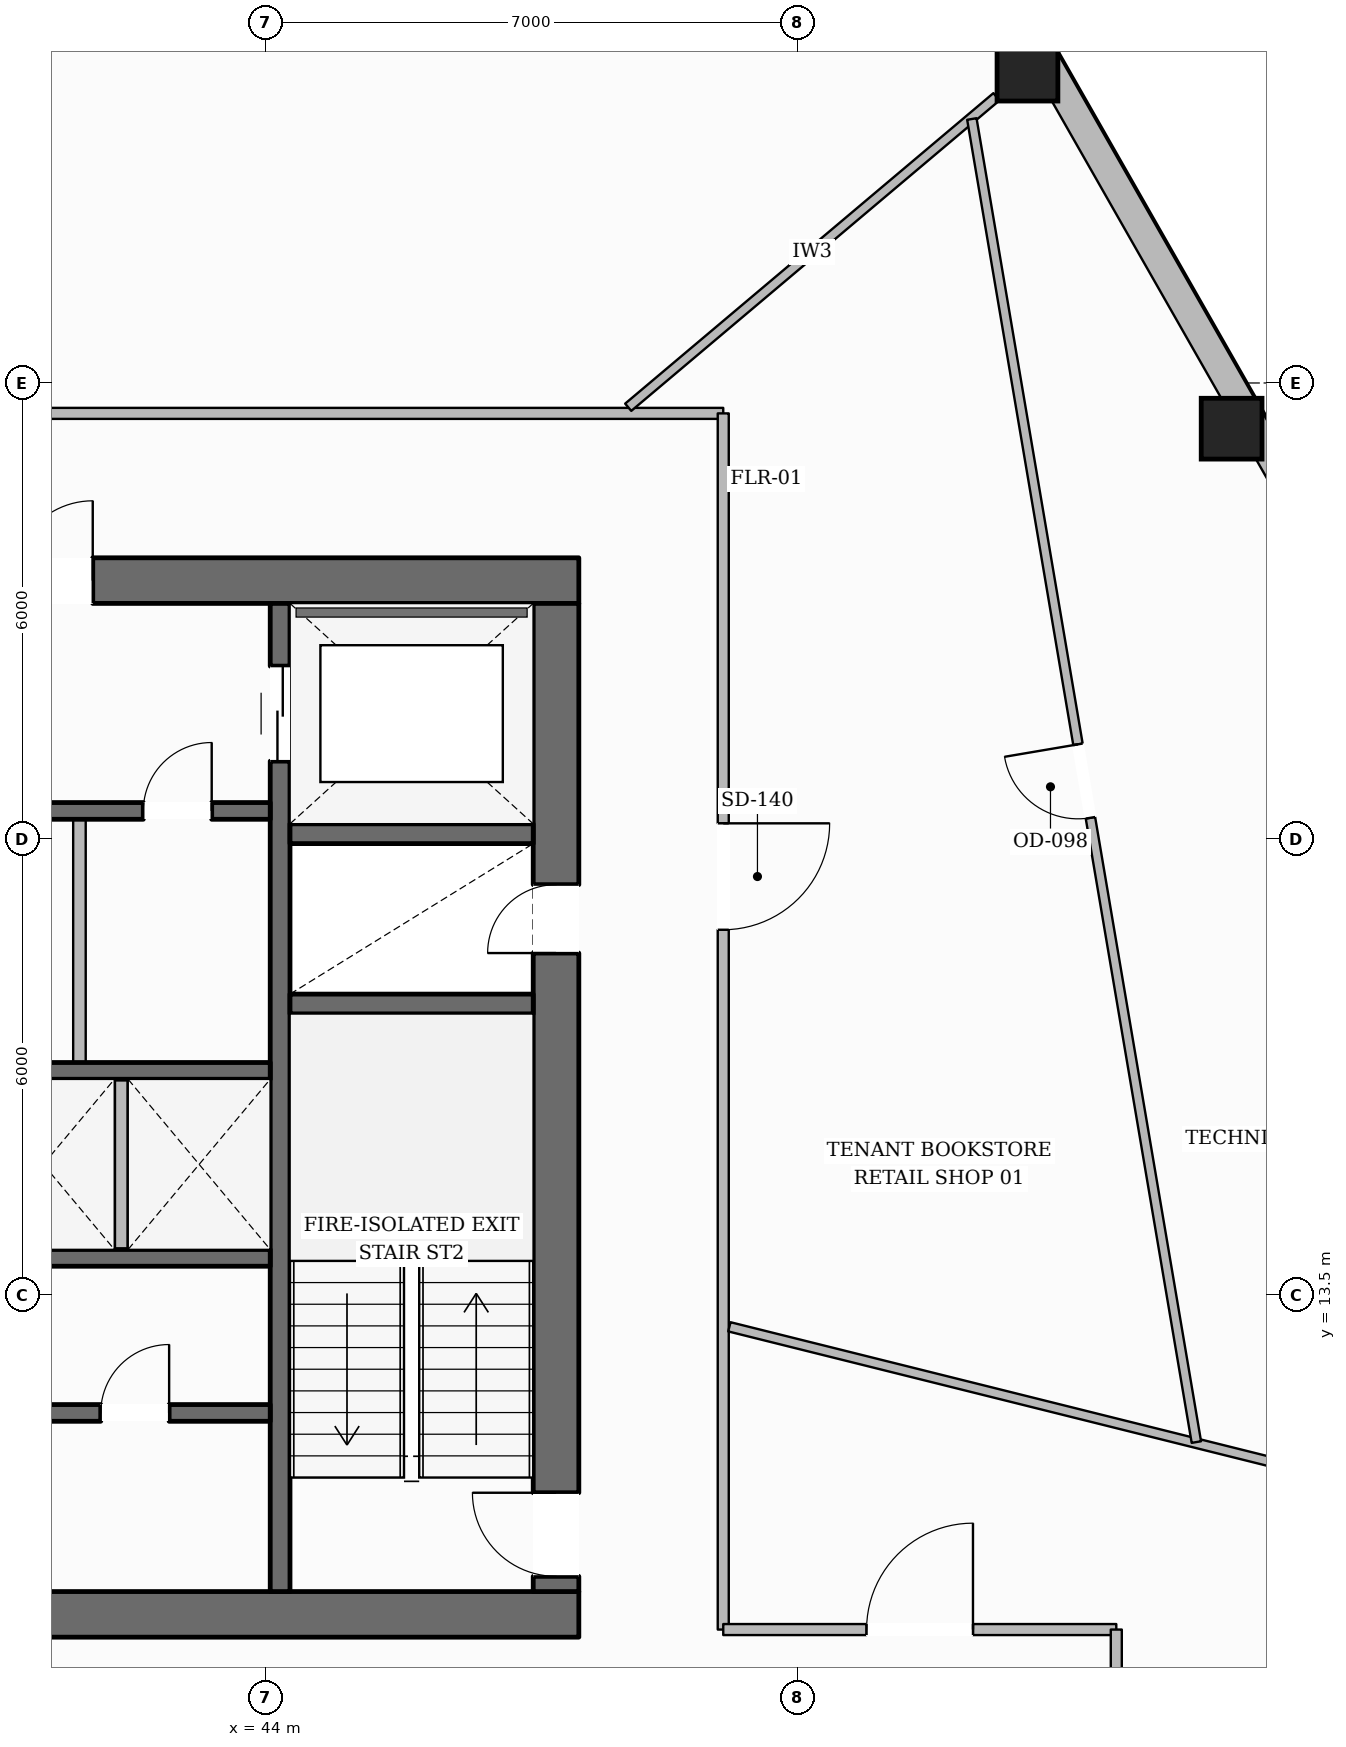
"""IFC4 building model, lengths in metres.
Left out: names, types, materials, properties, quantities, classifications, styles, units other than length and angle.
Written with IfcOpenShell. Run it as: python <this file> out.ifc"""

import sys

from ifc_helpers import new_model, si_unit, direction, frame, frame_2d, origin, origin_2d, place, context, subcontext, project, spatial, rectangle, hollow_rectangle, extrude, element, fill, save


model = new_model("IFC4")
c1 = context("Model", 3, precision=1e-05, world=origin(), true_north=direction((0.0, 1.0)))
c2 = subcontext(c1, "Body", "Model", "MODEL_VIEW")
j1 = project(units=[si_unit("LENGTHUNIT", "METRE"), si_unit("PLANEANGLEUNIT", "RADIAN")], contexts=[c1])
p1 = place(None, origin())
s1 = spatial("IfcSite", under=j1, at=p1, CompositionType="ELEMENT")
p2 = place(p1, origin())
s2 = spatial("IfcBuilding", under=s1, at=p2, CompositionType="ELEMENT")
p3 = place(p2, frame((0.0, 0.0, 13.7)))
s3 = spatial("IfcBuildingStorey", under=s2, at=p3, CompositionType="ELEMENT", Elevation=13.7)
p4 = place(p3, frame((27.88, 9.3, 0.0), z_axis=(0.0, 0.0, 1.0), x_axis=(1.0, 0.0, 0.0)))
e1 = element("IfcWall", 1, at=p4, inside=s3, PredefinedType="SOLIDWALL", context=c2, shape_type="SweptSolid", body=[
    extrude(rectangle(XDim=20.24, YDim=0.6, at=frame_2d((10.12, 0.0))), origin(), (0.0, 0.0, 1.0), 3.59),
])
p5 = place(p4, frame((10.62, 0.0, 0.0)))
e2 = element("IfcOpeningElement", 2, at=p5, cuts=e1, PredefinedType="OPENING", context=c2, shape_type="SweptSolid", body=[
    extrude(rectangle(XDim=1.4, YDim=2.2, at=frame_2d((0.7, 1.1))), frame((0.0, 0.31, 0.0), z_axis=(0.0, -1.0, 0.0), x_axis=(1.0, 0.0, 0.0)), (0.0, 0.0, 1.0), 0.62),
])
p6 = place(p3, frame((27.88, 22.9, 0.0), z_axis=(0.0, 0.0, 1.0), x_axis=(1.0, 0.0, 0.0)))
e3 = element("IfcWall", 3, at=p6, inside=s3, PredefinedType="SOLIDWALL", context=c2, shape_type="SweptSolid", body=[
    extrude(rectangle(XDim=20.24, YDim=0.6, at=frame_2d((10.12, 0.0))), origin(), (0.0, 0.0, 1.0), 3.59),
])
p7 = place(p6, frame((6.395, 0.0, 0.0)))
e4 = element("IfcOpeningElement", 4, at=p7, cuts=e3, PredefinedType="OPENING", context=c2, shape_type="SweptSolid", body=[
    extrude(rectangle(XDim=1.05, YDim=2.15, at=frame_2d((0.525, 1.075))), frame((0.0, 0.31, 0.0), z_axis=(0.0, -1.0, 0.0), x_axis=(1.0, 0.0, 0.0)), (0.0, 0.0, 1.0), 0.62),
])
p8 = place(p6, frame((12.795, 0.0, 0.0)))
e5 = element("IfcOpeningElement", 5, at=p8, cuts=e3, PredefinedType="OPENING", context=c2, shape_type="SweptSolid", body=[
    extrude(rectangle(XDim=1.05, YDim=2.15, at=frame_2d((0.525, 1.075))), frame((0.0, 0.31, 0.0), z_axis=(0.0, -1.0, 0.0), x_axis=(1.0, 0.0, 0.0)), (0.0, 0.0, 1.0), 0.62),
])
p9 = place(p3, frame((47.82, 9.6, 0.0), z_axis=(0.0, 0.0, 1.0), x_axis=(0.0, 1.0, 0.0)))
e6 = element("IfcWall", 6, at=p9, inside=s3, PredefinedType="SOLIDWALL", context=c2, shape_type="SweptSolid", body=[
    extrude(rectangle(XDim=13.0, YDim=0.6, at=frame_2d((6.5, 0.0))), origin(), (0.0, 0.0, 1.0), 3.59),
])
p10 = place(p9, frame((0.2, 0.0, 0.0)))
e7 = element("IfcOpeningElement", 7, at=p10, cuts=e6, PredefinedType="OPENING", context=c2, shape_type="SweptSolid", body=[
    extrude(rectangle(XDim=1.1, YDim=2.15, at=frame_2d((0.55, 1.075))), frame((0.0, 0.31, 0.0), z_axis=(0.0, -1.0, 0.0), x_axis=(1.0, 0.0, 0.0)), (0.0, 0.0, 1.0), 0.62),
])
p11 = place(p9, frame((8.4, 0.0, 0.0)))
e8 = element("IfcOpeningElement", 8, at=p11, cuts=e6, PredefinedType="OPENING", context=c2, shape_type="SweptSolid", body=[
    extrude(rectangle(XDim=0.9, YDim=2.1, at=frame_2d((0.45, 1.05))), frame((0.0, 0.31, 0.0), z_axis=(0.0, -1.0, 0.0), x_axis=(1.0, 0.0, 0.0)), (0.0, 0.0, 1.0), 0.62),
])
p12 = place(p3, frame((44.19, 9.6, 0.0), z_axis=(0.0, 0.0, 1.0), x_axis=(0.0, 1.0, 0.0)))
e9 = element("IfcWall", 9, at=p12, inside=s3, PredefinedType="SHEAR", context=c2, shape_type="SweptSolid", body=[
    extrude(rectangle(XDim=13.0, YDim=0.26, at=frame_2d((6.5, 0.0))), origin(), (0.0, 0.0, 1.0), 3.59),
])
p13 = place(p12, frame((10.925, 0.0, 0.0)))
e10 = element("IfcOpeningElement", 10, at=p13, cuts=e9, PredefinedType="OPENING", context=c2, shape_type="SweptSolid", body=[
    extrude(rectangle(XDim=1.25, YDim=2.25, at=frame_2d((0.625, 1.125))), frame((0.0, 0.14, 0.0), z_axis=(0.0, -1.0, 0.0), x_axis=(1.0, 0.0, 0.0)), (0.0, 0.0, 1.0), 0.28),
])
for number, where, z_axis, x_axis in (
    (11, (44.32, 17.33, 0.0), (0.0, 0.0, 1.0), (1.0, 0.0, 0.0)),
    (12, (44.32, 19.57, 0.0), (0.0, 0.0, 1.0), (1.0, 0.0, 0.0)),
):
    element("IfcWall", number, at=place(p3, frame(where, z_axis=z_axis, x_axis=x_axis)), inside=s3, PredefinedType="SHEAR", context=c2, shape_type="SweptSolid", body=[
        extrude(rectangle(XDim=3.2, YDim=0.26, at=frame_2d((1.6, 0.0))), origin(), (0.0, 0.0, 1.0), 3.59),
    ])
p14 = place(p3, frame((31.94, 19.87, 0.0), z_axis=(0.0, 0.0, 1.0), x_axis=(1.0, 0.0, 0.0)))
e13 = element("IfcWall", 13, at=p14, inside=s3, PredefinedType="SOLIDWALL", context=c2, shape_type="SweptSolid", body=[
    extrude(rectangle(XDim=12.12, YDim=0.22, at=frame_2d((6.06, 0.0))), origin(), (0.0, 0.0, 1.0), 3.59),
])
p15 = place(p14, frame((6.3, 0.0, 0.0)))
e14 = element("IfcOpeningElement", 14, at=p15, cuts=e13, PredefinedType="OPENING", context=c2, shape_type="SweptSolid", body=[
    extrude(rectangle(XDim=1.1, YDim=2.15, at=frame_2d((0.55, 1.075))), frame((0.0, 0.12, 0.0), z_axis=(0.0, -1.0, 0.0), x_axis=(1.0, 0.0, 0.0)), (0.0, 0.0, 1.0), 0.24),
])
p16 = place(p14, frame((8.23, 0.0, 0.0)))
e15 = element("IfcOpeningElement", 15, at=p16, cuts=e13, PredefinedType="OPENING", context=c2, shape_type="SweptSolid", body=[
    extrude(rectangle(XDim=0.9, YDim=2.1, at=frame_2d((0.45, 1.05))), frame((0.0, 0.12, 0.0), z_axis=(0.0, -1.0, 0.0), x_axis=(1.0, 0.0, 0.0)), (0.0, 0.0, 1.0), 0.24),
])
p17 = place(p14, frame((10.45, 0.0, 0.0)))
e16 = element("IfcOpeningElement", 16, at=p17, cuts=e13, PredefinedType="OPENING", context=c2, shape_type="SweptSolid", body=[
    extrude(rectangle(XDim=0.9, YDim=2.1, at=frame_2d((0.45, 1.05))), frame((0.0, 0.12, 0.0), z_axis=(0.0, -1.0, 0.0), x_axis=(1.0, 0.0, 0.0)), (0.0, 0.0, 1.0), 0.24),
])
p18 = place(p3, frame((31.94, 16.45, 0.0), z_axis=(0.0, 0.0, 1.0), x_axis=(1.0, 0.0, 0.0)))
e17 = element("IfcWall", 17, at=p18, inside=s3, PredefinedType="SOLIDWALL", context=c2, shape_type="SweptSolid", body=[
    extrude(rectangle(XDim=12.12, YDim=0.22, at=frame_2d((6.06, 0.0))), origin(), (0.0, 0.0, 1.0), 3.59),
])
p19 = place(p3, frame((31.94, 13.99, 0.0), z_axis=(0.0, 0.0, 1.0), x_axis=(1.0, 0.0, 0.0)))
e18 = element("IfcWall", 18, at=p19, inside=s3, PredefinedType="SOLIDWALL", context=c2, shape_type="SweptSolid", body=[
    extrude(rectangle(XDim=12.12, YDim=0.22, at=frame_2d((6.06, 0.0))), origin(), (0.0, 0.0, 1.0), 3.59),
])
p20 = place(p19, frame((0.385, 0.0, 0.0)))
e19 = element("IfcOpeningElement", 19, at=p20, cuts=e18, PredefinedType="OPENING", context=c2, shape_type="SweptSolid", body=[
    extrude(rectangle(XDim=1.1, YDim=2.2, at=frame_2d((0.55, 1.1))), frame((0.0, 0.12, 0.0), z_axis=(0.0, -1.0, 0.0), x_axis=(1.0, 0.0, 0.0)), (0.0, 0.0, 1.0), 0.24),
])
p21 = place(p19, frame((2.435, 0.0, 0.0)))
e20 = element("IfcOpeningElement", 20, at=p21, cuts=e18, PredefinedType="OPENING", context=c2, shape_type="SweptSolid", body=[
    extrude(rectangle(XDim=1.1, YDim=2.2, at=frame_2d((0.55, 1.1))), frame((0.0, 0.12, 0.0), z_axis=(0.0, -1.0, 0.0), x_axis=(1.0, 0.0, 0.0)), (0.0, 0.0, 1.0), 0.24),
])
p22 = place(p19, frame((4.485, 0.0, 0.0)))
e21 = element("IfcOpeningElement", 21, at=p22, cuts=e18, PredefinedType="OPENING", context=c2, shape_type="SweptSolid", body=[
    extrude(rectangle(XDim=1.1, YDim=2.2, at=frame_2d((0.55, 1.1))), frame((0.0, 0.12, 0.0), z_axis=(0.0, -1.0, 0.0), x_axis=(1.0, 0.0, 0.0)), (0.0, 0.0, 1.0), 0.24),
])
p23 = place(p3, frame((40.28, 11.95, 0.0), z_axis=(0.0, 0.0, 1.0), x_axis=(1.0, 0.0, 0.0)))
e22 = element("IfcWall", 22, at=p23, inside=s3, PredefinedType="SOLIDWALL", context=c2, shape_type="SweptSolid", body=[
    extrude(rectangle(XDim=3.78, YDim=0.22, at=frame_2d((1.89, 0.0))), origin(), (0.0, 0.0, 1.0), 3.59),
])
p24 = place(p23, frame((1.55, 0.0, 0.0)))
e23 = element("IfcOpeningElement", 23, at=p24, cuts=e22, PredefinedType="OPENING", context=c2, shape_type="SweptSolid", body=[
    extrude(rectangle(XDim=0.9, YDim=2.1, at=frame_2d((0.45, 1.05))), frame((0.0, 0.12, 0.0), z_axis=(0.0, -1.0, 0.0), x_axis=(1.0, 0.0, 0.0)), (0.0, 0.0, 1.0), 0.24),
])
for number, where, z_axis, x_axis in (
    (24, (56.708, 24.899, 0.0), (0.0, 0.0, 1.0), (1.0, 0.0, 0.0)),
    (25, (54.022, 29.609, 0.0), (0.0, 0.0, 1.0), (1.0, 0.0, 0.0)),
):
    element("IfcColumn", number, at=place(p3, frame(where, z_axis=z_axis, x_axis=x_axis)), inside=s3, PredefinedType="COLUMN", context=c2, shape_type="SweptSolid", body=[
        extrude(hollow_rectangle(XDim=0.8, YDim=0.8, WallThickness=0.036, at=origin_2d()), origin(), (0.0, 0.0, 1.0), 3.59),
    ])
p25 = place(p3, frame((62.551, 15.755, 0.0), z_axis=(0.0, 0.0, 1.0), x_axis=(-0.498758778038, -0.866740838619, 0.0)))
e26 = element("IfcWall", 26, at=p25, inside=s3, PredefinedType="STANDARD", context=c2, shape_type="SweptSolid", body=[
    extrude(rectangle(XDim=17.156, YDim=0.3, at=frame_2d((8.578, 0.0))), origin(), (0.0, 0.0, 1.0), 2.97),
])
p26 = place(p25, frame((7.978, 0.0, 0.65)))
e27 = element("IfcOpeningElement", 27, at=p26, cuts=e26, PredefinedType="OPENING", context=c2, shape_type="SweptSolid", body=[
    extrude(rectangle(XDim=1.2, YDim=1.7, at=frame_2d((0.6, 0.85))), frame((0.0, 0.16, 0.0), z_axis=(0.0, -1.0, 0.0), x_axis=(1.0, 0.0, 0.0)), (0.0, 0.0, 1.0), 0.32),
])
p27 = place(p3, frame((45.962, 44.292, 0.0), z_axis=(0.0, 0.0, 1.0), x_axis=(0.495312811216, -0.868714693697, 0.0)))
e28 = element("IfcWall", 28, at=p27, inside=s3, PredefinedType="STANDARD", context=c2, shape_type="SweptSolid", body=[
    extrude(rectangle(XDim=33.49, YDim=0.38, at=frame_2d((16.745, 0.0))), origin(), (0.0, 0.0, 1.0), 2.97),
])
p28 = place(p27, frame((29.479, 0.0, 0.65)))
e29 = element("IfcOpeningElement", 29, at=p28, cuts=e28, PredefinedType="OPENING", context=c2, shape_type="SweptSolid", body=[
    extrude(rectangle(XDim=1.65, YDim=1.75, at=frame_2d((0.825, 0.875))), frame((0.0, 0.2, 0.0), z_axis=(0.0, -1.0, 0.0), x_axis=(1.0, 0.0, 0.0)), (0.0, 0.0, 1.0), 0.4),
])
p29 = place(p27, frame((24.056, 0.0, 0.65)))
e30 = element("IfcOpeningElement", 30, at=p29, cuts=e28, PredefinedType="OPENING", context=c2, shape_type="SweptSolid", body=[
    extrude(rectangle(XDim=1.65, YDim=1.75, at=frame_2d((0.825, 0.875))), frame((0.0, 0.2, 0.0), z_axis=(0.0, -1.0, 0.0), x_axis=(1.0, 0.0, 0.0)), (0.0, 0.0, 1.0), 0.4),
])
p30 = place(p27, frame((13.211, 0.0, 0.65)))
e31 = element("IfcOpeningElement", 31, at=p30, cuts=e28, PredefinedType="OPENING", context=c2, shape_type="SweptSolid", body=[
    extrude(rectangle(XDim=1.65, YDim=1.75, at=frame_2d((0.825, 0.875))), frame((0.0, 0.2, 0.0), z_axis=(0.0, -1.0, 0.0), x_axis=(1.0, 0.0, 0.0)), (0.0, 0.0, 1.0), 0.4),
])
p31 = place(p27, frame((7.789, 0.0, 0.65)))
e32 = element("IfcOpeningElement", 32, at=p31, cuts=e28, PredefinedType="OPENING", context=c2, shape_type="SweptSolid", body=[
    extrude(rectangle(XDim=1.65, YDim=1.75, at=frame_2d((0.825, 0.875))), frame((0.0, 0.2, 0.0), z_axis=(0.0, -1.0, 0.0), x_axis=(1.0, 0.0, 0.0)), (0.0, 0.0, 1.0), 0.4),
])
p32 = place(p27, frame((2.366, 0.0, 0.65)))
e33 = element("IfcOpeningElement", 33, at=p32, cuts=e28, PredefinedType="OPENING", context=c2, shape_type="SweptSolid", body=[
    extrude(rectangle(XDim=1.65, YDim=1.75, at=frame_2d((0.825, 0.875))), frame((0.0, 0.2, 0.0), z_axis=(0.0, -1.0, 0.0), x_axis=(1.0, 0.0, 0.0)), (0.0, 0.0, 1.0), 0.4),
])
p33 = place(p3, frame((42.1, 14.1, 0.0), z_axis=(0.0, 0.0, 1.0), x_axis=(0.0, 1.0, 0.0)))
e34 = element("IfcWall", 34, at=p33, inside=s3, PredefinedType="PARTITIONING", context=c2, shape_type="SweptSolid", body=[
    extrude(rectangle(XDim=2.24, YDim=0.165, at=frame_2d((1.12, 0.0))), origin(), (0.0, 0.0, 1.0), 3.59),
])
p34 = place(p3, frame((41.55, 16.56, 0.0), z_axis=(0.0, 0.0, 1.0), x_axis=(0.0, 1.0, 0.0)))
e35 = element("IfcWall", 35, at=p34, inside=s3, PredefinedType="PARTITIONING", context=c2, shape_type="SweptSolid", body=[
    extrude(rectangle(XDim=3.2, YDim=0.165, at=frame_2d((1.6, 0.0))), origin(), (0.0, 0.0, 1.0), 3.59),
])
p35 = place(p3, frame((39.0, 25.1, 0.0), z_axis=(0.0, 0.0, 1.0), x_axis=(1.0, 0.0, 0.0)))
e36 = element("IfcWall", 36, at=p35, inside=s3, PredefinedType="PARTITIONING", context=c2, shape_type="SweptSolid", body=[
    extrude(rectangle(XDim=11.02, YDim=0.145, at=frame_2d((5.51, 0.0))), origin(), (0.0, 0.0, 1.0), 3.59),
])
p36 = place(p3, frame((50.02, 25.1, 0.0), z_axis=(0.0, 0.0, 1.0), x_axis=(0.0, -1.0, 0.0)))
e37 = element("IfcWall", 37, at=p36, inside=s3, PredefinedType="PARTITIONING", context=c2, shape_type="SweptSolid", body=[
    extrude(rectangle(XDim=16.0, YDim=0.145, at=frame_2d((8.0, 0.0))), origin(), (0.0, 0.0, 1.0), 3.278),
])
p37 = place(p36, frame((5.393, 0.0, 0.0)))
e38 = element("IfcOpeningElement", 38, at=p37, cuts=e37, PredefinedType="OPENING", context=c2, shape_type="SweptSolid", body=[
    extrude(rectangle(XDim=1.4, YDim=2.2, at=frame_2d((0.7, 1.1))), frame((0.0, 0.083, 0.0), z_axis=(0.0, -1.0, 0.0), x_axis=(1.0, 0.0, 0.0)), (0.0, 0.0, 1.0), 0.165),
])
p38 = place(p3, frame((50.02, 9.1, 0.0), z_axis=(0.0, 0.0, 1.0), x_axis=(1.0, 0.0, 0.0)))
e39 = element("IfcWall", 39, at=p38, inside=s3, PredefinedType="PARTITIONING", context=c2, shape_type="SweptSolid", body=[
    extrude(rectangle(XDim=5.171, YDim=0.145, at=frame_2d((2.585, 0.0))), origin(), (0.0, 0.0, 1.0), 3.59),
])
p39 = place(p38, frame((1.885, 0.0, 0.0)))
e40 = element("IfcOpeningElement", 40, at=p39, cuts=e39, PredefinedType="OPENING", context=c2, shape_type="SweptSolid", body=[
    extrude(rectangle(XDim=1.4, YDim=2.2, at=frame_2d((0.7, 1.1))), frame((0.0, 0.083, 0.0), z_axis=(0.0, -1.0, 0.0), x_axis=(1.0, 0.0, 0.0)), (0.0, 0.0, 1.0), 0.165),
])
p40 = place(p3, frame((55.191, 9.1, 0.0), z_axis=(0.0, 0.0, 1.0), x_axis=(0.0, -1.0, 0.0)))
e41 = element("IfcWall", 41, at=p40, inside=s3, PredefinedType="PARTITIONING", context=c2, shape_type="SweptSolid", body=[
    extrude(rectangle(XDim=2.0, YDim=0.145, at=frame_2d((1.0, 0.0))), origin(), (0.0, 0.0, 1.0), 3.59),
])
p41 = place(p3, frame((48.77, 25.18, 0.0), z_axis=(0.0, 0.0, 1.0), x_axis=(0.764507431672, 0.644614913664, 0.0)))
e42 = element("IfcWall", 42, at=p41, inside=s3, PredefinedType="PARTITIONING", context=c2, shape_type="SweptSolid", body=[
    extrude(rectangle(XDim=6.337, YDim=0.125, at=frame_2d((3.168, 0.0))), origin(), (0.0, 0.0, 1.0), 3.057),
])
p42 = place(p3, frame((50.101, 13.083, 0.0), z_axis=(0.0, 0.0, 1.0), x_axis=(0.970295533253, -0.241922669771, 0.0)))
e43 = element("IfcWall", 43, at=p42, inside=s3, PredefinedType="PARTITIONING", context=c2, shape_type="SweptSolid", body=[
    extrude(rectangle(XDim=9.654, YDim=0.125, at=frame_2d((4.827, 0.0))), origin(), (0.0, 0.0, 1.0), 3.59),
])
p43 = place(p3, frame((56.244, 11.567, 0.0), z_axis=(0.0, 0.0, 1.0), x_axis=(-0.167295506577, 0.985906797562, 0.0)))
e44 = element("IfcWall", 44, at=p43, inside=s3, PredefinedType="PARTITIONING", context=c2, shape_type="SweptSolid", body=[
    extrude(rectangle(XDim=17.655, YDim=0.125, at=frame_2d((8.828, 0.0))), origin(), (0.0, 0.0, 1.0), 3.278),
])
p44 = place(p43, frame((8.33, 0.0, 0.0)))
e45 = element("IfcOpeningElement", 45, at=p44, cuts=e44, PredefinedType="OPENING", context=c2, shape_type="SweptSolid", body=[
    extrude(rectangle(XDim=0.98, YDim=2.15, at=frame_2d((0.49, 1.075))), frame((0.0, 0.073, 0.0), z_axis=(0.0, -1.0, 0.0), x_axis=(1.0, 0.0, 0.0)), (0.0, 0.0, 1.0), 0.145),
])
p45 = place(p10, origin())
e46 = element("IfcDoor", 46, at=p45, inside=s3, OperationType="SINGLE_SWING_RIGHT", PredefinedType="DOOR", context=c2, shape_type="SweptSolid", body=[
    extrude(rectangle(XDim=1.1, YDim=2.15, at=frame_2d((0.55, 1.075))), frame((0.0, 0.025, 0.0), z_axis=(0.0, -1.0, 0.0), x_axis=(1.0, 0.0, 0.0)), (0.0, 0.0, 1.0), 0.05),
])
fill(e7, e46)
p46 = place(p11, origin())
e47 = element("IfcDoor", 47, at=p46, inside=s3, OperationType="SINGLE_SWING_LEFT", PredefinedType="DOOR", context=c2, shape_type="SweptSolid", body=[
    extrude(rectangle(XDim=0.9, YDim=2.1, at=frame_2d((0.45, 1.05))), frame((0.0, 0.025, 0.0), z_axis=(0.0, -1.0, 0.0), x_axis=(1.0, 0.0, 0.0)), (0.0, 0.0, 1.0), 0.05),
])
fill(e8, e47)
p47 = place(p8, origin())
e48 = element("IfcDoor", 48, at=p47, inside=s3, OperationType="SINGLE_SWING_RIGHT", PredefinedType="DOOR", context=c2, shape_type="SweptSolid", body=[
    extrude(rectangle(XDim=1.05, YDim=2.15, at=frame_2d((0.525, 1.075))), frame((0.0, 0.025, 0.0), z_axis=(0.0, -1.0, 0.0), x_axis=(1.0, 0.0, 0.0)), (0.0, 0.0, 1.0), 0.05),
])
fill(e5, e48)
p48 = place(p13, origin())
e49 = element("IfcDoor", 49, at=p48, inside=s3, OperationType="DOUBLE_DOOR_SLIDING", PredefinedType="DOOR", context=c2, shape_type="SweptSolid", body=[
    extrude(rectangle(XDim=1.25, YDim=2.25, at=frame_2d((0.625, 1.125))), frame((0.0, 0.025, 0.0), z_axis=(0.0, -1.0, 0.0), x_axis=(1.0, 0.0, 0.0)), (0.0, 0.0, 1.0), 0.05),
])
fill(e10, e49)
p49 = place(p17, origin())
e50 = element("IfcDoor", 50, at=p49, inside=s3, OperationType="SINGLE_SWING_RIGHT", PredefinedType="DOOR", context=c2, shape_type="SweptSolid", body=[
    extrude(rectangle(XDim=0.9, YDim=2.1, at=frame_2d((0.45, 1.05))), frame((0.0, 0.025, 0.0), z_axis=(0.0, -1.0, 0.0), x_axis=(1.0, 0.0, 0.0)), (0.0, 0.0, 1.0), 0.05),
])
fill(e16, e50)
p50 = place(p24, origin())
e51 = element("IfcDoor", 51, at=p50, inside=s3, OperationType="SINGLE_SWING_RIGHT", PredefinedType="DOOR", context=c2, shape_type="SweptSolid", body=[
    extrude(rectangle(XDim=0.9, YDim=2.1, at=frame_2d((0.45, 1.05))), frame((0.0, 0.025, 0.0), z_axis=(0.0, -1.0, 0.0), x_axis=(1.0, 0.0, 0.0)), (0.0, 0.0, 1.0), 0.05),
])
fill(e23, e51)
p51 = place(p37, origin())
e52 = element("IfcDoor", 52, at=p51, inside=s3, OperationType="SINGLE_SWING_LEFT", PredefinedType="DOOR", context=c2, shape_type="SweptSolid", body=[
    extrude(rectangle(XDim=1.4, YDim=2.2, at=frame_2d((0.7, 1.1))), frame((0.0, 0.025, 0.0), z_axis=(0.0, -1.0, 0.0), x_axis=(1.0, 0.0, 0.0)), (0.0, 0.0, 1.0), 0.05),
])
fill(e38, e52)
p52 = place(p44, origin())
e53 = element("IfcDoor", 53, at=p52, inside=s3, OperationType="SINGLE_SWING_RIGHT", PredefinedType="DOOR", context=c2, shape_type="SweptSolid", body=[
    extrude(rectangle(XDim=0.98, YDim=2.15, at=frame_2d((0.49, 1.075))), frame((0.0, 0.025, 0.0), z_axis=(0.0, -1.0, 0.0), x_axis=(1.0, 0.0, 0.0)), (0.0, 0.0, 1.0), 0.05),
])
fill(e45, e53)
p53 = place(p39, origin())
e54 = element("IfcDoor", 54, at=p53, inside=s3, OperationType="SINGLE_SWING_RIGHT", PredefinedType="DOOR", context=c2, shape_type="SweptSolid", body=[
    extrude(rectangle(XDim=1.4, YDim=2.2, at=frame_2d((0.7, 1.1))), frame((0.0, 0.025, 0.0), z_axis=(0.0, -1.0, 0.0), x_axis=(1.0, 0.0, 0.0)), (0.0, 0.0, 1.0), 0.05),
])
fill(e40, e54)
save(model, sys.argv[1])
